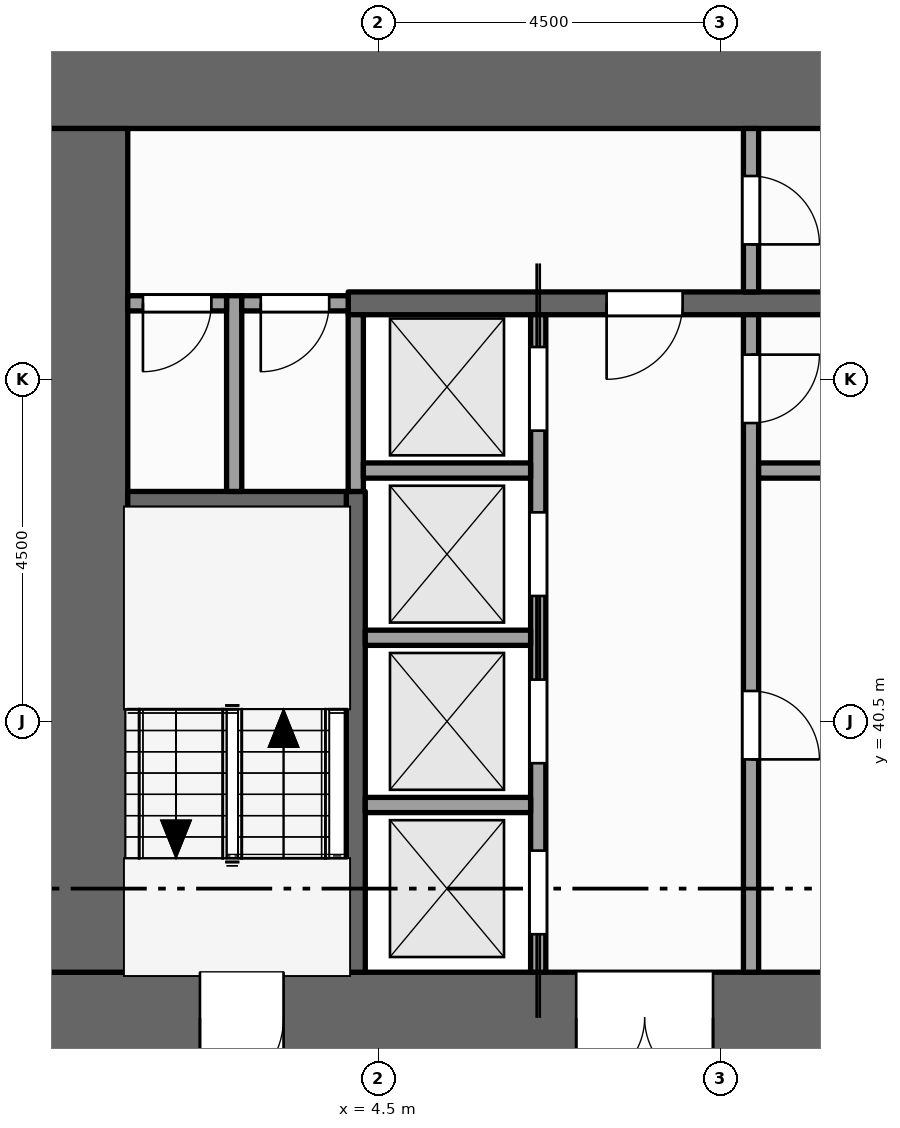
"""IFC4 building model, lengths in metres.
Left out: names, types, materials, properties, quantities, classifications, styles, units other than length and angle.
Written with IfcOpenShell. Run it as: python <this file> out.ifc"""

import sys

from ifc_helpers import new_model, si_unit, direction, frame, frame_2d, origin, place, context, subcontext, project, spatial, rectangle, extrude, element, fill, save


model = new_model("IFC4")
c1 = context("Model", 3, precision=1e-05, world=origin(), true_north=direction((0.0, 1.0)))
c2 = subcontext(c1, "Body", "Model", "MODEL_VIEW")
j1 = project(units=[si_unit("LENGTHUNIT", "METRE"), si_unit("PLANEANGLEUNIT", "RADIAN")], contexts=[c1])
p1 = place(None, origin())
s1 = spatial("IfcSite", under=j1, at=p1, CompositionType="ELEMENT")
p2 = place(p1, origin())
s2 = spatial("IfcBuilding", under=s1, at=p2, CompositionType="ELEMENT")
p3 = place(p2, frame((0.0, 0.0, 24.0)))
s3 = spatial("IfcBuildingStorey", under=s2, at=p3, CompositionType="ELEMENT", Elevation=24.0)
p4 = place(p3, frame((0.0, 36.6, -0.15), z_axis=(0.0, 0.0, 1.0), x_axis=(1.0, 0.0, 0.0)))
e1 = element("IfcWall", 1, at=p4, inside=s3, PredefinedType="SHEAR", context=c2, shape_type="SweptSolid", body=[
    extrude(rectangle(XDim=22.5, YDim=1.2, at=frame_2d((11.25, 0.0))), origin(), (0.0, 0.0, 1.0), 5.0),
])
p5 = place(p4, frame((7.1, 0.0, 0.15)))
e2 = element("IfcOpeningElement", 2, at=p5, cuts=e1, PredefinedType="OPENING", context=c2, shape_type="SweptSolid", body=[
    extrude(rectangle(XDim=1.8, YDim=2.1, at=frame_2d((0.9, 1.05))), frame((0.0, 0.61, 0.0), z_axis=(0.0, -1.0, 0.0), x_axis=(1.0, 0.0, 0.0)), (0.0, 0.0, 1.0), 1.22),
])
p6 = place(p4, frame((13.15, 0.0, 0.15)))
e3 = element("IfcOpeningElement", 3, at=p6, cuts=e1, PredefinedType="OPENING", context=c2, shape_type="SweptSolid", body=[
    extrude(rectangle(XDim=1.1, YDim=2.1, at=frame_2d((0.55, 1.05))), frame((0.0, 0.61, 0.0), z_axis=(0.0, -1.0, 0.0), x_axis=(1.0, 0.0, 0.0)), (0.0, 0.0, 1.0), 1.22),
])
p7 = place(p4, frame((2.15, 0.0, 0.15)))
e4 = element("IfcOpeningElement", 4, at=p7, cuts=e1, PredefinedType="OPENING", context=c2, shape_type="SweptSolid", body=[
    extrude(rectangle(XDim=1.1, YDim=2.1, at=frame_2d((0.55, 1.05))), frame((0.0, 0.61, 0.0), z_axis=(0.0, -1.0, 0.0), x_axis=(1.0, 0.0, 0.0)), (0.0, 0.0, 1.0), 1.22),
])
p8 = place(p4, frame((19.35, 0.0, 0.15)))
e5 = element("IfcOpeningElement", 5, at=p8, cuts=e1, PredefinedType="OPENING", context=c2, shape_type="SweptSolid", body=[
    extrude(rectangle(XDim=1.1, YDim=2.1, at=frame_2d((0.55, 1.05))), frame((0.0, 0.61, 0.0), z_axis=(0.0, -1.0, 0.0), x_axis=(1.0, 0.0, 0.0)), (0.0, 0.0, 1.0), 1.22),
])
p9 = place(p3, frame((0.0, 48.9, -0.15), z_axis=(0.0, 0.0, 1.0), x_axis=(1.0, 0.0, 0.0)))
e6 = element("IfcWall", 6, at=p9, inside=s3, PredefinedType="SHEAR", context=c2, shape_type="SweptSolid", body=[
    extrude(rectangle(XDim=22.5, YDim=1.2, at=frame_2d((11.25, 0.0))), origin(), (0.0, 0.0, 1.0), 5.0),
])
p10 = place(p3, frame((0.6, 37.2, -0.15), z_axis=(0.0, 0.0, 1.0), x_axis=(0.0, 1.0, 0.0)))
e7 = element("IfcWall", 7, at=p10, inside=s3, PredefinedType="SHEAR", context=c2, shape_type="SweptSolid", body=[
    extrude(rectangle(XDim=11.1, YDim=1.2, at=frame_2d((5.55, 0.0))), origin(), (0.0, 0.0, 1.0), 5.0),
])
p11 = place(p3, frame((2.6, 43.525, 0.0), z_axis=(0.0, 0.0, 1.0), x_axis=(0.0, 1.0, 0.0)))
e8 = element("IfcWall", 8, at=p11, inside=s3, PredefinedType="PARTITIONING", context=c2, shape_type="SweptSolid", body=[
    extrude(rectangle(XDim=2.575, YDim=0.2, at=frame_2d((1.288, 0.0))), origin(), (0.0, 0.0, 1.0), 4.85),
])
p12 = place(p3, frame((4.2, 37.2, 0.0), z_axis=(0.0, 0.0, 1.0), x_axis=(0.0, 1.0, 0.0)))
e9 = element("IfcWall", 9, at=p12, inside=s3, PredefinedType="SHEAR", context=c2, shape_type="SweptSolid", body=[
    extrude(rectangle(XDim=6.325, YDim=0.25, at=frame_2d((3.163, 0.0))), origin(), (0.0, 0.0, 1.0), 4.85),
])
p13 = place(p3, frame((4.2, 43.525, 0.0), z_axis=(0.0, 0.0, 1.0), x_axis=(0.0, 1.0, 0.0)))
e10 = element("IfcWall", 10, at=p13, inside=s3, PredefinedType="SOLIDWALL", context=c2, shape_type="SweptSolid", body=[
    extrude(rectangle(XDim=2.325, YDim=0.2, at=frame_2d((1.163, 0.0))), origin(), (0.0, 0.0, 1.0), 4.85),
])
p14 = place(p3, frame((6.6, 37.2, 0.0), z_axis=(0.0, 0.0, 1.0), x_axis=(0.0, 1.0, 0.0)))
e11 = element("IfcWall", 11, at=p14, inside=s3, PredefinedType="SOLIDWALL", context=c2, shape_type="SweptSolid", body=[
    extrude(rectangle(XDim=8.65, YDim=0.2, at=frame_2d((4.325, 0.0))), origin(), (0.0, 0.0, 1.0), 4.85),
])
p15 = place(p14, frame((0.5, 0.0, 0.012)))
e12 = element("IfcOpeningElement", 12, at=p15, cuts=e11, PredefinedType="OPENING", context=c2, shape_type="SweptSolid", body=[
    extrude(rectangle(XDim=1.1, YDim=2.1, at=frame_2d((0.55, 1.05))), frame((0.0, 0.11, 0.0), z_axis=(0.0, -1.0, 0.0), x_axis=(1.0, 0.0, 0.0)), (0.0, 0.0, 1.0), 0.22),
])
p16 = place(p14, frame((2.75, 0.0, 0.012)))
e13 = element("IfcOpeningElement", 13, at=p16, cuts=e11, PredefinedType="OPENING", context=c2, shape_type="SweptSolid", body=[
    extrude(rectangle(XDim=1.1, YDim=2.1, at=frame_2d((0.55, 1.05))), frame((0.0, 0.11, 0.0), z_axis=(0.0, -1.0, 0.0), x_axis=(1.0, 0.0, 0.0)), (0.0, 0.0, 1.0), 0.22),
])
p17 = place(p14, frame((4.95, 0.0, 0.012)))
e14 = element("IfcOpeningElement", 14, at=p17, cuts=e11, PredefinedType="OPENING", context=c2, shape_type="SweptSolid", body=[
    extrude(rectangle(XDim=1.1, YDim=2.1, at=frame_2d((0.55, 1.05))), frame((0.0, 0.11, 0.0), z_axis=(0.0, -1.0, 0.0), x_axis=(1.0, 0.0, 0.0)), (0.0, 0.0, 1.0), 0.22),
])
p18 = place(p14, frame((7.125, 0.0, 0.012)))
e15 = element("IfcOpeningElement", 15, at=p18, cuts=e11, PredefinedType="OPENING", context=c2, shape_type="SweptSolid", body=[
    extrude(rectangle(XDim=1.1, YDim=2.1, at=frame_2d((0.55, 1.05))), frame((0.0, 0.11, 0.0), z_axis=(0.0, -1.0, 0.0), x_axis=(1.0, 0.0, 0.0)), (0.0, 0.0, 1.0), 0.22),
])
p19 = place(p3, frame((9.4, 37.2, 0.0), z_axis=(0.0, 0.0, 1.0), x_axis=(0.0, 1.0, 0.0)))
e16 = element("IfcWall", 16, at=p19, inside=s3, PredefinedType="PARTITIONING", context=c2, shape_type="SweptSolid", body=[
    extrude(rectangle(XDim=8.65, YDim=0.2, at=frame_2d((4.325, 0.0))), origin(), (0.0, 0.0, 1.0), 4.85),
])
p20 = place(p19, frame((2.8, 0.0, 0.0)))
e17 = element("IfcOpeningElement", 17, at=p20, cuts=e16, PredefinedType="OPENING", context=c2, shape_type="SweptSolid", body=[
    extrude(rectangle(XDim=0.9, YDim=2.1, at=frame_2d((0.45, 1.05))), frame((0.0, 0.11, 0.0), z_axis=(0.0, -1.0, 0.0), x_axis=(1.0, 0.0, 0.0)), (0.0, 0.0, 1.0), 0.22),
])
p21 = place(p19, frame((7.225, 0.0, 0.0)))
e18 = element("IfcOpeningElement", 18, at=p21, cuts=e16, PredefinedType="OPENING", context=c2, shape_type="SweptSolid", body=[
    extrude(rectangle(XDim=0.9, YDim=2.1, at=frame_2d((0.45, 1.05))), frame((0.0, 0.11, 0.0), z_axis=(0.0, -1.0, 0.0), x_axis=(1.0, 0.0, 0.0)), (0.0, 0.0, 1.0), 0.22),
])
p22 = place(p3, frame((9.4, 46.15, 0.0), z_axis=(0.0, 0.0, 1.0), x_axis=(0.0, 1.0, 0.0)))
e19 = element("IfcWall", 19, at=p22, inside=s3, PredefinedType="PARTITIONING", context=c2, shape_type="SweptSolid", body=[
    extrude(rectangle(XDim=2.15, YDim=0.2, at=frame_2d((1.075, 0.0))), origin(), (0.0, 0.0, 1.0), 4.85),
])
p23 = place(p22, frame((0.625, 0.0, 0.0)))
e20 = element("IfcOpeningElement", 20, at=p23, cuts=e19, PredefinedType="OPENING", context=c2, shape_type="SweptSolid", body=[
    extrude(rectangle(XDim=0.9, YDim=2.1, at=frame_2d((0.45, 1.05))), frame((0.0, 0.11, 0.0), z_axis=(0.0, -1.0, 0.0), x_axis=(1.0, 0.0, 0.0)), (0.0, 0.0, 1.0), 0.22),
])
for number, where, z_axis, x_axis in (
    (21, (4.325, 39.4, 0.0), (0.0, 0.0, 1.0), (1.0, 0.0, 0.0)),
    (22, (4.325, 41.6, 0.0), (0.0, 0.0, 1.0), (1.0, 0.0, 0.0)),
):
    element("IfcWall", number, at=place(p3, frame(where, z_axis=z_axis, x_axis=x_axis)), inside=s3, PredefinedType="SOLIDWALL", context=c2, shape_type="SweptSolid", body=[
        extrude(rectangle(XDim=2.175, YDim=0.2, at=frame_2d((1.087, 0.0))), origin(), (0.0, 0.0, 1.0), 4.85),
    ])
p24 = place(p3, frame((1.2, 43.4, 0.0), z_axis=(0.0, 0.0, 1.0), x_axis=(1.0, 0.0, 0.0)))
e23 = element("IfcWall", 23, at=p24, inside=s3, PredefinedType="SHEAR", context=c2, shape_type="SweptSolid", body=[
    extrude(rectangle(XDim=2.875, YDim=0.25, at=frame_2d((1.438, 0.0))), origin(), (0.0, 0.0, 1.0), 4.85),
])
p25 = place(p3, frame((4.3, 43.8, 0.0), z_axis=(0.0, 0.0, 1.0), x_axis=(1.0, 0.0, 0.0)))
e24 = element("IfcWall", 24, at=p25, inside=s3, PredefinedType="SOLIDWALL", context=c2, shape_type="SweptSolid", body=[
    extrude(rectangle(XDim=2.2, YDim=0.2, at=frame_2d((1.1, 0.0))), origin(), (0.0, 0.0, 1.0), 4.85),
])
p26 = place(p3, frame((9.5, 43.8, 0.0), z_axis=(0.0, 0.0, 1.0), x_axis=(1.0, 0.0, 0.0)))
e25 = element("IfcWall", 25, at=p26, inside=s3, PredefinedType="PARTITIONING", context=c2, shape_type="SweptSolid", body=[
    extrude(rectangle(XDim=2.2, YDim=0.2, at=frame_2d((1.1, 0.0))), origin(), (0.0, 0.0, 1.0), 4.85),
])
p27 = place(p3, frame((1.2, 46.0, 0.0), z_axis=(0.0, 0.0, 1.0), x_axis=(1.0, 0.0, 0.0)))
e26 = element("IfcWall", 26, at=p27, inside=s3, PredefinedType="PARTITIONING", context=c2, shape_type="SweptSolid", body=[
    extrude(rectangle(XDim=1.3, YDim=0.2, at=frame_2d((0.65, 0.0))), origin(), (0.0, 0.0, 1.0), 4.85),
])
p28 = place(p27, frame((0.2, 0.0, 0.0)))
e27 = element("IfcOpeningElement", 27, at=p28, cuts=e26, PredefinedType="OPENING", context=c2, shape_type="SweptSolid", body=[
    extrude(rectangle(XDim=0.9, YDim=2.1, at=frame_2d((0.45, 1.05))), frame((0.0, 0.11, 0.0), z_axis=(0.0, -1.0, 0.0), x_axis=(1.0, 0.0, 0.0)), (0.0, 0.0, 1.0), 0.22),
])
p29 = place(p3, frame((2.7, 46.0, 0.0), z_axis=(0.0, 0.0, 1.0), x_axis=(1.0, 0.0, 0.0)))
e28 = element("IfcWall", 28, at=p29, inside=s3, PredefinedType="PARTITIONING", context=c2, shape_type="SweptSolid", body=[
    extrude(rectangle(XDim=1.4, YDim=0.2, at=frame_2d((0.7, 0.0))), origin(), (0.0, 0.0, 1.0), 4.85),
])
p30 = place(p29, frame((0.25, 0.0, 0.0)))
e29 = element("IfcOpeningElement", 29, at=p30, cuts=e28, PredefinedType="OPENING", context=c2, shape_type="SweptSolid", body=[
    extrude(rectangle(XDim=0.9, YDim=2.1, at=frame_2d((0.45, 1.05))), frame((0.0, 0.11, 0.0), z_axis=(0.0, -1.0, 0.0), x_axis=(1.0, 0.0, 0.0)), (0.0, 0.0, 1.0), 0.22),
])
p31 = place(p3, frame((4.1, 46.0, 0.0), z_axis=(0.0, 0.0, 1.0), x_axis=(1.0, 0.0, 0.0)))
e30 = element("IfcWall", 30, at=p31, inside=s3, PredefinedType="SHEAR", context=c2, shape_type="SweptSolid", body=[
    extrude(rectangle(XDim=14.5, YDim=0.3, at=frame_2d((7.25, 0.0))), origin(), (0.0, 0.0, 1.0), 4.85),
])
p32 = place(p31, frame((3.4, 0.0, 0.0)))
e31 = element("IfcOpeningElement", 31, at=p32, cuts=e30, PredefinedType="OPENING", context=c2, shape_type="SweptSolid", body=[
    extrude(rectangle(XDim=1.0, YDim=2.1, at=frame_2d((0.5, 1.05))), frame((0.0, 0.16, 0.0), z_axis=(0.0, -1.0, 0.0), x_axis=(1.0, 0.0, 0.0)), (0.0, 0.0, 1.0), 0.32),
])
p33 = place(p31, frame((9.1, 0.0, 0.0)))
e32 = element("IfcOpeningElement", 32, at=p33, cuts=e30, PredefinedType="OPENING", context=c2, shape_type="SweptSolid", body=[
    extrude(rectangle(XDim=1.0, YDim=2.1, at=frame_2d((0.5, 1.05))), frame((0.0, 0.16, 0.0), z_axis=(0.0, -1.0, 0.0), x_axis=(1.0, 0.0, 0.0)), (0.0, 0.0, 1.0), 0.32),
])
p34 = place(p15, origin())
e33 = element("IfcDoor", 33, at=p34, inside=s3, OperationType="SLIDING_TO_LEFT", PredefinedType="DOOR", context=c2, shape_type="SweptSolid", body=[
    extrude(rectangle(XDim=1.1, YDim=2.1, at=frame_2d((0.55, 1.05))), frame((0.0, 0.025, 0.0), z_axis=(0.0, -1.0, 0.0), x_axis=(1.0, 0.0, 0.0)), (0.0, 0.0, 1.0), 0.05),
])
fill(e12, e33)
p35 = place(p16, origin())
e34 = element("IfcDoor", 34, at=p35, inside=s3, OperationType="SLIDING_TO_RIGHT", PredefinedType="DOOR", context=c2, shape_type="SweptSolid", body=[
    extrude(rectangle(XDim=1.1, YDim=2.1, at=frame_2d((0.55, 1.05))), frame((0.0, 0.025, 0.0), z_axis=(0.0, -1.0, 0.0), x_axis=(1.0, 0.0, 0.0)), (0.0, 0.0, 1.0), 0.05),
])
fill(e13, e34)
p36 = place(p17, origin())
e35 = element("IfcDoor", 35, at=p36, inside=s3, OperationType="SLIDING_TO_LEFT", PredefinedType="DOOR", context=c2, shape_type="SweptSolid", body=[
    extrude(rectangle(XDim=1.1, YDim=2.1, at=frame_2d((0.55, 1.05))), frame((0.0, 0.025, 0.0), z_axis=(0.0, -1.0, 0.0), x_axis=(1.0, 0.0, 0.0)), (0.0, 0.0, 1.0), 0.05),
])
fill(e14, e35)
p37 = place(p18, origin())
e36 = element("IfcDoor", 36, at=p37, inside=s3, OperationType="SLIDING_TO_RIGHT", PredefinedType="DOOR", context=c2, shape_type="SweptSolid", body=[
    extrude(rectangle(XDim=1.1, YDim=2.1, at=frame_2d((0.55, 1.05))), frame((0.0, 0.025, 0.0), z_axis=(0.0, -1.0, 0.0), x_axis=(1.0, 0.0, 0.0)), (0.0, 0.0, 1.0), 0.05),
])
fill(e15, e36)
p38 = place(p5, origin())
e37 = element("IfcDoor", 37, at=p38, inside=s3, OperationType="DOUBLE_DOOR_SINGLE_SWING", PredefinedType="DOOR", context=c2, shape_type="SweptSolid", body=[
    extrude(rectangle(XDim=1.8, YDim=2.1, at=frame_2d((0.9, 1.05))), frame((0.0, 0.025, 0.0), z_axis=(0.0, -1.0, 0.0), x_axis=(1.0, 0.0, 0.0)), (0.0, 0.0, 1.0), 0.05),
])
fill(e2, e37)
p39 = place(p32, origin())
e38 = element("IfcDoor", 38, at=p39, inside=s3, OperationType="SINGLE_SWING_LEFT", PredefinedType="DOOR", context=c2, shape_type="SweptSolid", body=[
    extrude(rectangle(XDim=1.0, YDim=2.1, at=frame_2d((0.5, 1.05))), frame((0.0, 0.025, 0.0), z_axis=(0.0, -1.0, 0.0), x_axis=(1.0, 0.0, 0.0)), (0.0, 0.0, 1.0), 0.05),
])
fill(e31, e38)
p40 = place(p23, origin())
e39 = element("IfcDoor", 39, at=p40, inside=s3, OperationType="SINGLE_SWING_LEFT", PredefinedType="DOOR", context=c2, shape_type="SweptSolid", body=[
    extrude(rectangle(XDim=0.9, YDim=2.1, at=frame_2d((0.45, 1.05))), frame((0.0, 0.025, 0.0), z_axis=(0.0, -1.0, 0.0), x_axis=(1.0, 0.0, 0.0)), (0.0, 0.0, 1.0), 0.05),
])
fill(e20, e39)
p41 = place(p7, origin())
e40 = element("IfcDoor", 40, at=p41, inside=s3, OperationType="SINGLE_SWING_LEFT", PredefinedType="DOOR", context=c2, shape_type="SweptSolid", body=[
    extrude(rectangle(XDim=1.1, YDim=2.1, at=frame_2d((0.55, 1.05))), frame((0.0, 0.025, 0.0), z_axis=(0.0, -1.0, 0.0), x_axis=(1.0, 0.0, 0.0)), (0.0, 0.0, 1.0), 0.05),
])
fill(e4, e40)
p42 = place(p28, origin())
e41 = element("IfcDoor", 41, at=p42, inside=s3, OperationType="SINGLE_SWING_LEFT", PredefinedType="DOOR", context=c2, shape_type="SweptSolid", body=[
    extrude(rectangle(XDim=0.9, YDim=2.1, at=frame_2d((0.45, 1.05))), frame((0.0, 0.025, 0.0), z_axis=(0.0, -1.0, 0.0), x_axis=(1.0, 0.0, 0.0)), (0.0, 0.0, 1.0), 0.05),
])
fill(e27, e41)
p43 = place(p30, origin())
e42 = element("IfcDoor", 42, at=p43, inside=s3, OperationType="SINGLE_SWING_LEFT", PredefinedType="DOOR", context=c2, shape_type="SweptSolid", body=[
    extrude(rectangle(XDim=0.9, YDim=2.1, at=frame_2d((0.45, 1.05))), frame((0.0, 0.025, 0.0), z_axis=(0.0, -1.0, 0.0), x_axis=(1.0, 0.0, 0.0)), (0.0, 0.0, 1.0), 0.05),
])
fill(e29, e42)
p44 = place(p20, origin())
e43 = element("IfcDoor", 43, at=p44, inside=s3, OperationType="SINGLE_SWING_LEFT", PredefinedType="DOOR", context=c2, shape_type="SweptSolid", body=[
    extrude(rectangle(XDim=0.9, YDim=2.1, at=frame_2d((0.45, 1.05))), frame((0.0, 0.025, 0.0), z_axis=(0.0, -1.0, 0.0), x_axis=(1.0, 0.0, 0.0)), (0.0, 0.0, 1.0), 0.05),
])
fill(e17, e43)
p45 = place(p21, origin())
e44 = element("IfcDoor", 44, at=p45, inside=s3, OperationType="SINGLE_SWING_RIGHT", PredefinedType="DOOR", context=c2, shape_type="SweptSolid", body=[
    extrude(rectangle(XDim=0.9, YDim=2.1, at=frame_2d((0.45, 1.05))), frame((0.0, 0.025, 0.0), z_axis=(0.0, -1.0, 0.0), x_axis=(1.0, 0.0, 0.0)), (0.0, 0.0, 1.0), 0.05),
])
fill(e18, e44)
save(model, sys.argv[1])
